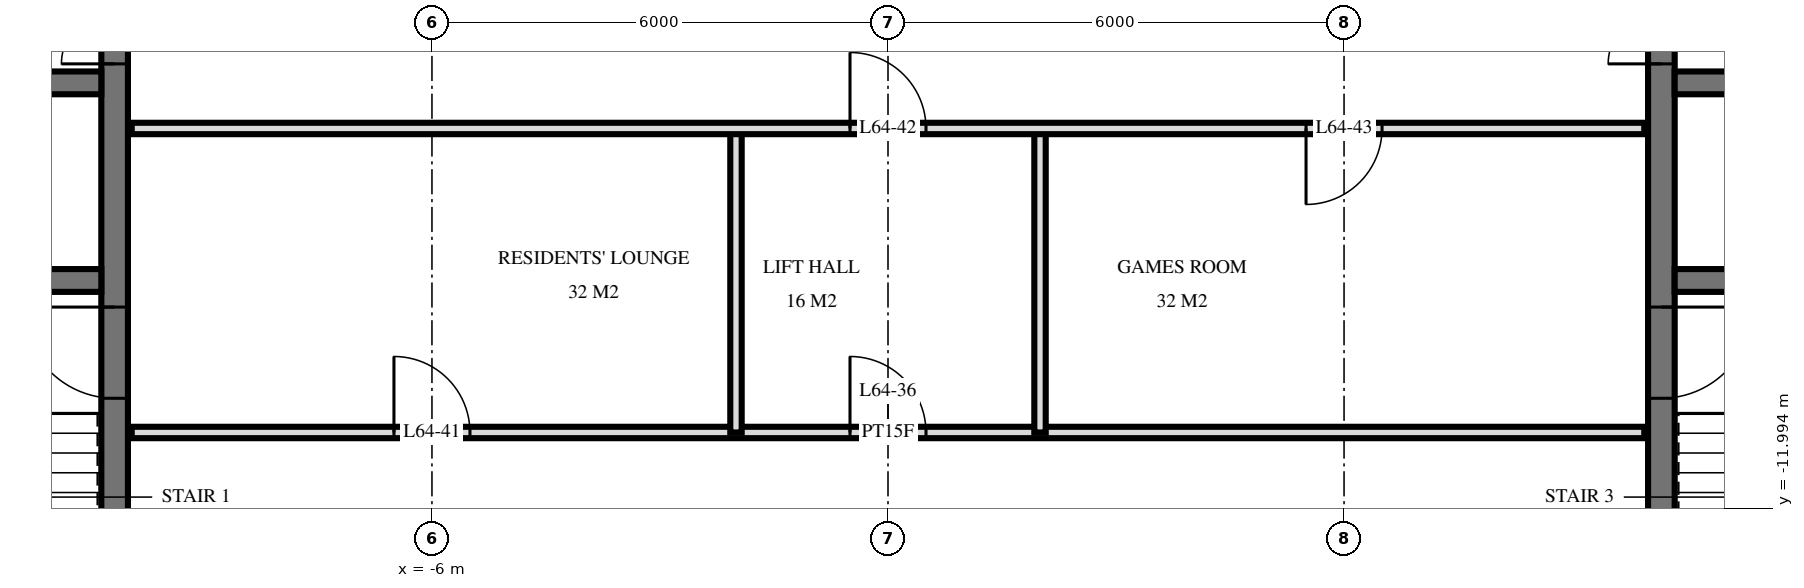
"""IFC4 building model, lengths in metres.
Left out: names, types, materials, properties, quantities, classifications, styles, units other than length and angle.
Written with IfcOpenShell. Run it as: python <this file> out.ifc"""

import sys

from ifc_helpers import new_model, si_unit, direction, frame, frame_2d, origin, place, context, subcontext, project, spatial, rectangle, extrude, element, fill, save


model = new_model("IFC4")
c1 = context("Model", 3, precision=1e-05, world=origin(), true_north=direction((0.0, 1.0)))
c2 = subcontext(c1, "Body", "Model", "MODEL_VIEW")
j1 = project(units=[si_unit("LENGTHUNIT", "METRE"), si_unit("PLANEANGLEUNIT", "RADIAN")], contexts=[c1])
p1 = place(None, origin())
s1 = spatial("IfcSite", under=j1, at=p1, CompositionType="ELEMENT")
p2 = place(p1, origin())
s2 = spatial("IfcBuilding", under=s1, at=p2, CompositionType="ELEMENT")
p3 = place(p2, frame((0.0, 0.0, 243.1)))
s3 = spatial("IfcBuildingStorey", under=s2, at=p3, CompositionType="ELEMENT", Elevation=243.1)
p4 = place(p3, frame((-10.175, -14.55, 0.0), z_axis=(0.0, 0.0, 1.0), x_axis=(0.0, 1.0, 0.0)))
e1 = element("IfcWall", 1, at=p4, inside=s3, PredefinedType="SHEAR", context=c2, shape_type="SweptSolid", body=[
    extrude(rectangle(XDim=14.1, YDim=0.35, at=frame_2d((7.05, 0.0))), origin(), (0.0, 0.0, 1.0), 3.5),
])
p5 = place(p4, frame((8.4, 0.0, 0.0)))
e2 = element("IfcOpeningElement", 2, at=p5, cuts=e1, PredefinedType="OPENING", context=c2, shape_type="SweptSolid", body=[
    extrude(rectangle(XDim=1.4, YDim=2.4, at=frame_2d((0.7, 1.2))), frame((0.0, 0.185, 0.0), z_axis=(0.0, -1.0, 0.0), x_axis=(1.0, 0.0, 0.0)), (0.0, 0.0, 1.0), 0.37),
])
p6 = place(p4, frame((10.0, 0.0, 0.0)))
e3 = element("IfcOpeningElement", 3, at=p6, cuts=e1, PredefinedType="OPENING", context=c2, shape_type="SweptSolid", body=[
    extrude(rectangle(XDim=1.4, YDim=2.4, at=frame_2d((0.7, 1.2))), frame((0.0, 0.185, 0.0), z_axis=(0.0, -1.0, 0.0), x_axis=(1.0, 0.0, 0.0)), (0.0, 0.0, 1.0), 0.37),
])
p7 = place(p4, frame((4.0, 0.0, 0.0)))
e4 = element("IfcOpeningElement", 4, at=p7, cuts=e1, PredefinedType="OPENING", context=c2, shape_type="SweptSolid", body=[
    extrude(rectangle(XDim=1.2, YDim=2.1, at=frame_2d((0.6, 1.05))), frame((0.0, 0.185, 0.0), z_axis=(0.0, -1.0, 0.0), x_axis=(1.0, 0.0, 0.0)), (0.0, 0.0, 1.0), 0.37),
])
p8 = place(p3, frame((-24.05, -6.4, 0.0), z_axis=(0.0, 0.0, 1.0), x_axis=(1.0, 0.0, 0.0)))
e5 = element("IfcWall", 5, at=p8, inside=s3, PredefinedType="SHEAR", context=c2, shape_type="SweptSolid", body=[
    extrude(rectangle(XDim=13.7, YDim=0.3, at=frame_2d((6.85, 0.0))), origin(), (0.0, 0.0, 1.0), 3.5),
])
p9 = place(p8, frame((0.55, 0.0, 0.0)))
e6 = element("IfcOpeningElement", 6, at=p9, cuts=e5, PredefinedType="OPENING", context=c2, shape_type="SweptSolid", body=[
    extrude(rectangle(XDim=1.1, YDim=2.1, at=frame_2d((0.55, 1.05))), frame((0.0, 0.16, 0.0), z_axis=(0.0, -1.0, 0.0), x_axis=(1.0, 0.0, 0.0)), (0.0, 0.0, 1.0), 0.32),
])
p10 = place(p8, frame((5.8, 0.0, 0.0)))
e7 = element("IfcOpeningElement", 7, at=p10, cuts=e5, PredefinedType="OPENING", context=c2, shape_type="SweptSolid", body=[
    extrude(rectangle(XDim=1.1, YDim=2.1, at=frame_2d((0.55, 1.05))), frame((0.0, 0.16, 0.0), z_axis=(0.0, -1.0, 0.0), x_axis=(1.0, 0.0, 0.0)), (0.0, 0.0, 1.0), 0.32),
])
p11 = place(p3, frame((-24.05, -9.0, 0.0), z_axis=(0.0, 0.0, 1.0), x_axis=(1.0, 0.0, 0.0)))
e8 = element("IfcWall", 8, at=p11, inside=s3, PredefinedType="SHEAR", context=c2, shape_type="SweptSolid", body=[
    extrude(rectangle(XDim=13.7, YDim=0.3, at=frame_2d((6.85, 0.0))), origin(), (0.0, 0.0, 1.0), 3.5),
])
p12 = place(p11, frame((8.8, 0.0, 0.0)))
e9 = element("IfcOpeningElement", 9, at=p12, cuts=e8, PredefinedType="OPENING", context=c2, shape_type="SweptSolid", body=[
    extrude(rectangle(XDim=1.1, YDim=2.1, at=frame_2d((0.55, 1.05))), frame((0.0, 0.16, 0.0), z_axis=(0.0, -1.0, 0.0), x_axis=(1.0, 0.0, 0.0)), (0.0, 0.0, 1.0), 0.32),
])
p13 = place(p3, frame((10.175, -14.55, 0.0), z_axis=(0.0, 0.0, 1.0), x_axis=(0.0, 1.0, 0.0)))
e10 = element("IfcWall", 10, at=p13, inside=s3, PredefinedType="SHEAR", context=c2, shape_type="SweptSolid", body=[
    extrude(rectangle(XDim=14.1, YDim=0.35, at=frame_2d((7.05, 0.0))), origin(), (0.0, 0.0, 1.0), 3.5),
])
p14 = place(p13, frame((8.4, 0.0, 0.0)))
e11 = element("IfcOpeningElement", 11, at=p14, cuts=e10, PredefinedType="OPENING", context=c2, shape_type="SweptSolid", body=[
    extrude(rectangle(XDim=1.4, YDim=2.4, at=frame_2d((0.7, 1.2))), frame((0.0, 0.185, 0.0), z_axis=(0.0, -1.0, 0.0), x_axis=(1.0, 0.0, 0.0)), (0.0, 0.0, 1.0), 0.37),
])
p15 = place(p13, frame((10.0, 0.0, 0.0)))
e12 = element("IfcOpeningElement", 12, at=p15, cuts=e10, PredefinedType="OPENING", context=c2, shape_type="SweptSolid", body=[
    extrude(rectangle(XDim=1.4, YDim=2.4, at=frame_2d((0.7, 1.2))), frame((0.0, 0.185, 0.0), z_axis=(0.0, -1.0, 0.0), x_axis=(1.0, 0.0, 0.0)), (0.0, 0.0, 1.0), 0.37),
])
p16 = place(p13, frame((4.0, 0.0, 0.0)))
e13 = element("IfcOpeningElement", 13, at=p16, cuts=e10, PredefinedType="OPENING", context=c2, shape_type="SweptSolid", body=[
    extrude(rectangle(XDim=1.2, YDim=2.1, at=frame_2d((0.6, 1.05))), frame((0.0, 0.185, 0.0), z_axis=(0.0, -1.0, 0.0), x_axis=(1.0, 0.0, 0.0)), (0.0, 0.0, 1.0), 0.37),
])
p17 = place(p3, frame((10.35, -6.4, 0.0), z_axis=(0.0, 0.0, 1.0), x_axis=(1.0, 0.0, 0.0)))
e14 = element("IfcWall", 14, at=p17, inside=s3, PredefinedType="SHEAR", context=c2, shape_type="SweptSolid", body=[
    extrude(rectangle(XDim=13.7, YDim=0.3, at=frame_2d((6.85, 0.0))), origin(), (0.0, 0.0, 1.0), 3.5),
])
p18 = place(p17, frame((12.05, 0.0, 0.0)))
e15 = element("IfcOpeningElement", 15, at=p18, cuts=e14, PredefinedType="OPENING", context=c2, shape_type="SweptSolid", body=[
    extrude(rectangle(XDim=1.1, YDim=2.1, at=frame_2d((0.55, 1.05))), frame((0.0, 0.16, 0.0), z_axis=(0.0, -1.0, 0.0), x_axis=(1.0, 0.0, 0.0)), (0.0, 0.0, 1.0), 0.32),
])
p19 = place(p17, frame((6.8, 0.0, 0.0)))
e16 = element("IfcOpeningElement", 16, at=p19, cuts=e14, PredefinedType="OPENING", context=c2, shape_type="SweptSolid", body=[
    extrude(rectangle(XDim=1.1, YDim=2.1, at=frame_2d((0.55, 1.05))), frame((0.0, 0.16, 0.0), z_axis=(0.0, -1.0, 0.0), x_axis=(1.0, 0.0, 0.0)), (0.0, 0.0, 1.0), 0.32),
])
p20 = place(p3, frame((10.35, -9.0, 0.0), z_axis=(0.0, 0.0, 1.0), x_axis=(1.0, 0.0, 0.0)))
e17 = element("IfcWall", 17, at=p20, inside=s3, PredefinedType="SHEAR", context=c2, shape_type="SweptSolid", body=[
    extrude(rectangle(XDim=13.7, YDim=0.3, at=frame_2d((6.85, 0.0))), origin(), (0.0, 0.0, 1.0), 3.5),
])
p21 = place(p20, frame((3.8, 0.0, 0.0)))
e18 = element("IfcOpeningElement", 18, at=p21, cuts=e17, PredefinedType="OPENING", context=c2, shape_type="SweptSolid", body=[
    extrude(rectangle(XDim=1.1, YDim=2.1, at=frame_2d((0.55, 1.05))), frame((0.0, 0.16, 0.0), z_axis=(0.0, -1.0, 0.0), x_axis=(1.0, 0.0, 0.0)), (0.0, 0.0, 1.0), 0.32),
])
for number, where, z_axis, x_axis in (
    (19, (2.0, -11.0, 0.0), (0.0, 0.0, 1.0), (0.0, 1.0, 0.0)),
    (20, (-2.0, -11.0, 0.0), (0.0, 0.0, 1.0), (0.0, 1.0, 0.0)),
):
    element("IfcWall", number, at=place(p3, frame(where, z_axis=z_axis, x_axis=x_axis)), inside=s3, PredefinedType="PARTITIONING", context=c2, shape_type="SweptSolid", body=[
        extrude(rectangle(XDim=4.0, YDim=0.15, at=frame_2d((2.0, 0.0))), origin(), (0.0, 0.0, 1.0), 3.22),
    ])
p22 = place(p3, frame((-9.95, -11.0, 0.0), z_axis=(0.0, 0.0, 1.0), x_axis=(1.0, 0.0, 0.0)))
e21 = element("IfcWall", 21, at=p22, inside=s3, PredefinedType="PARTITIONING", context=c2, shape_type="SweptSolid", body=[
    extrude(rectangle(XDim=19.9, YDim=0.15, at=frame_2d((9.95, 0.0))), origin(), (0.0, 0.0, 1.0), 3.22),
])
p23 = place(p22, frame((9.45, 0.0, 0.0)))
e22 = element("IfcOpeningElement", 22, at=p23, cuts=e21, PredefinedType="OPENING", context=c2, shape_type="SweptSolid", body=[
    extrude(rectangle(XDim=1.0, YDim=2.1, at=frame_2d((0.5, 1.05))), frame((0.0, 0.085, 0.0), z_axis=(0.0, -1.0, 0.0), x_axis=(1.0, 0.0, 0.0)), (0.0, 0.0, 1.0), 0.17),
])
p24 = place(p22, frame((3.45, 0.0, 0.0)))
e23 = element("IfcOpeningElement", 23, at=p24, cuts=e21, PredefinedType="OPENING", context=c2, shape_type="SweptSolid", body=[
    extrude(rectangle(XDim=1.0, YDim=2.1, at=frame_2d((0.5, 1.05))), frame((0.0, 0.085, 0.0), z_axis=(0.0, -1.0, 0.0), x_axis=(1.0, 0.0, 0.0)), (0.0, 0.0, 1.0), 0.17),
])
p25 = place(p3, frame((-9.95, -7.0, 0.0), z_axis=(0.0, 0.0, 1.0), x_axis=(1.0, 0.0, 0.0)))
e24 = element("IfcWall", 24, at=p25, inside=s3, PredefinedType="PARTITIONING", context=c2, shape_type="SweptSolid", body=[
    extrude(rectangle(XDim=19.9, YDim=0.15, at=frame_2d((9.95, 0.0))), origin(), (0.0, 0.0, 1.0), 3.22),
])
p26 = place(p25, frame((9.45, 0.0, 0.0)))
e25 = element("IfcOpeningElement", 25, at=p26, cuts=e24, PredefinedType="OPENING", context=c2, shape_type="SweptSolid", body=[
    extrude(rectangle(XDim=1.0, YDim=2.1, at=frame_2d((0.5, 1.05))), frame((0.0, 0.085, 0.0), z_axis=(0.0, -1.0, 0.0), x_axis=(1.0, 0.0, 0.0)), (0.0, 0.0, 1.0), 0.17),
])
p27 = place(p25, frame((15.45, 0.0, 0.0)))
e26 = element("IfcOpeningElement", 26, at=p27, cuts=e24, PredefinedType="OPENING", context=c2, shape_type="SweptSolid", body=[
    extrude(rectangle(XDim=1.0, YDim=2.1, at=frame_2d((0.5, 1.05))), frame((0.0, 0.085, 0.0), z_axis=(0.0, -1.0, 0.0), x_axis=(1.0, 0.0, 0.0)), (0.0, 0.0, 1.0), 0.17),
])
p28 = place(p5, origin())
e27 = element("IfcDoor", 27, at=p28, inside=s3, OperationType="DOUBLE_DOOR_SINGLE_SWING", PredefinedType="DOOR", context=c2, shape_type="SweptSolid", body=[
    extrude(rectangle(XDim=1.4, YDim=2.4, at=frame_2d((0.7, 1.2))), frame((0.0, 0.025, 0.0), z_axis=(0.0, -1.0, 0.0), x_axis=(1.0, 0.0, 0.0)), (0.0, 0.0, 1.0), 0.05),
])
fill(e2, e27)
p29 = place(p7, origin())
e28 = element("IfcDoor", 28, at=p29, inside=s3, OperationType="SINGLE_SWING_LEFT", PredefinedType="DOOR", context=c2, shape_type="SweptSolid", body=[
    extrude(rectangle(XDim=1.2, YDim=2.1, at=frame_2d((0.6, 1.05))), frame((0.0, 0.025, 0.0), z_axis=(0.0, -1.0, 0.0), x_axis=(1.0, 0.0, 0.0)), (0.0, 0.0, 1.0), 0.05),
])
fill(e4, e28)
p30 = place(p14, origin())
e29 = element("IfcDoor", 29, at=p30, inside=s3, OperationType="DOUBLE_DOOR_SINGLE_SWING", PredefinedType="DOOR", context=c2, shape_type="SweptSolid", body=[
    extrude(rectangle(XDim=1.4, YDim=2.4, at=frame_2d((0.7, 1.2))), frame((0.0, 0.025, 0.0), z_axis=(0.0, -1.0, 0.0), x_axis=(1.0, 0.0, 0.0)), (0.0, 0.0, 1.0), 0.05),
])
fill(e11, e29)
p31 = place(p16, frame((0.6, 0.0, 0.0), z_axis=(0.0, 0.0, 1.0), x_axis=(-1.0, 0.0, 0.0)))
e30 = element("IfcDoor", 30, at=p31, inside=s3, OperationType="SINGLE_SWING_RIGHT", PredefinedType="DOOR", context=c2, shape_type="SweptSolid", body=[
    extrude(rectangle(XDim=1.2, YDim=2.1, at=frame_2d((0.0, 1.05))), frame((0.0, -0.025, 0.0), z_axis=(0.0, 1.0, 0.0), x_axis=(-1.0, 0.0, 0.0)), (0.0, 0.0, 1.0), 0.05),
])
fill(e13, e30)
p32 = place(p23, origin())
e31 = element("IfcDoor", 31, at=p32, inside=s3, OperationType="SINGLE_SWING_RIGHT", PredefinedType="DOOR", context=c2, shape_type="SweptSolid", body=[
    extrude(rectangle(XDim=1.0, YDim=2.1, at=frame_2d((0.5, 1.05))), frame((0.0, 0.025, 0.0), z_axis=(0.0, -1.0, 0.0), x_axis=(1.0, 0.0, 0.0)), (0.0, 0.0, 1.0), 0.05),
])
fill(e22, e31)
p33 = place(p24, origin())
e32 = element("IfcDoor", 32, at=p33, inside=s3, OperationType="SINGLE_SWING_RIGHT", PredefinedType="DOOR", context=c2, shape_type="SweptSolid", body=[
    extrude(rectangle(XDim=1.0, YDim=2.1, at=frame_2d((0.5, 1.05))), frame((0.0, 0.025, 0.0), z_axis=(0.0, -1.0, 0.0), x_axis=(1.0, 0.0, 0.0)), (0.0, 0.0, 1.0), 0.05),
])
fill(e23, e32)
p34 = place(p26, origin())
e33 = element("IfcDoor", 33, at=p34, inside=s3, OperationType="SINGLE_SWING_RIGHT", PredefinedType="DOOR", context=c2, shape_type="SweptSolid", body=[
    extrude(rectangle(XDim=1.0, YDim=2.1, at=frame_2d((0.5, 1.05))), frame((0.0, 0.025, 0.0), z_axis=(0.0, -1.0, 0.0), x_axis=(1.0, 0.0, 0.0)), (0.0, 0.0, 1.0), 0.05),
])
fill(e25, e33)
p35 = place(p27, frame((0.5, 0.0, 0.0), z_axis=(0.0, 0.0, 1.0), x_axis=(-1.0, 0.0, 0.0)))
e34 = element("IfcDoor", 34, at=p35, inside=s3, OperationType="SINGLE_SWING_LEFT", PredefinedType="DOOR", context=c2, shape_type="SweptSolid", body=[
    extrude(rectangle(XDim=1.0, YDim=2.1, at=frame_2d((0.0, 1.05))), frame((0.0, -0.025, 0.0), z_axis=(0.0, 1.0, 0.0), x_axis=(-1.0, 0.0, 0.0)), (0.0, 0.0, 1.0), 0.05),
])
fill(e26, e34)
save(model, sys.argv[1])
